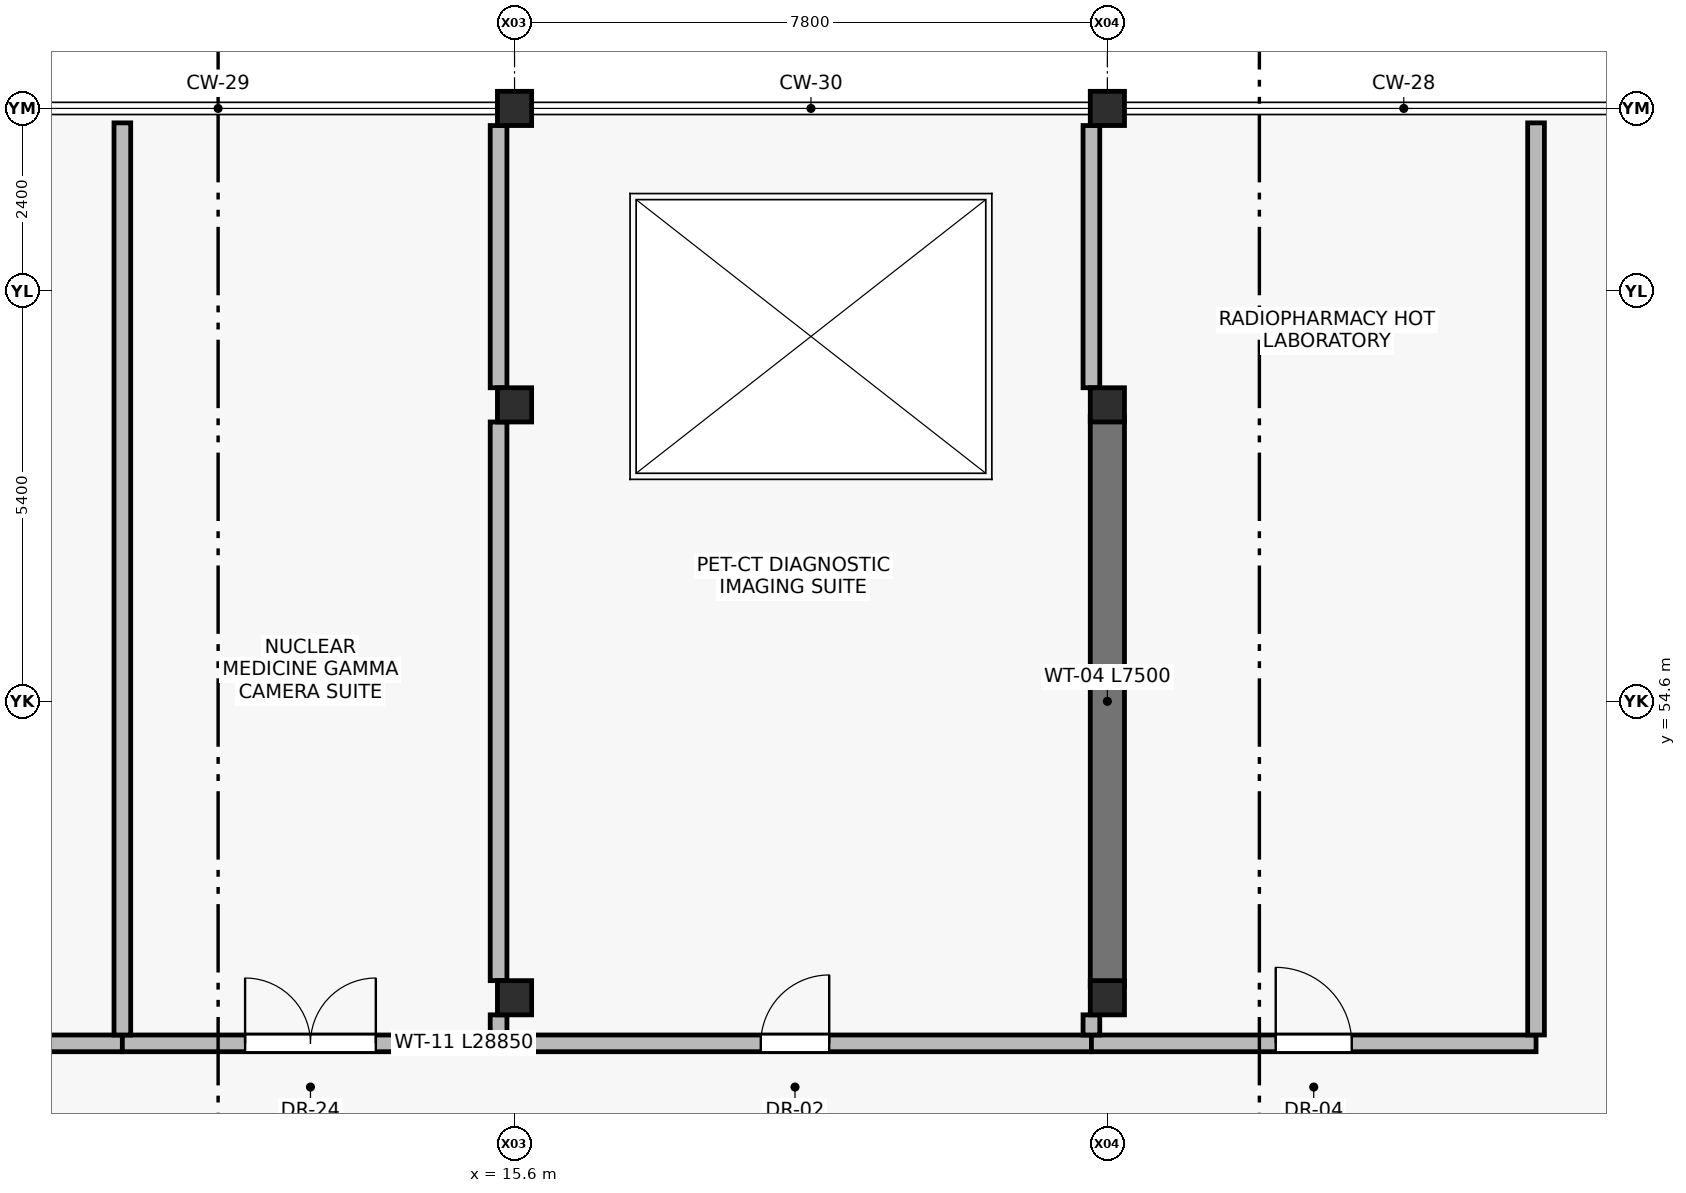
"""IFC4 building model, lengths in metres.
Left out: names, types, materials, properties, quantities, classifications, styles, units other than length and angle.
Written with IfcOpenShell. Run it as: python <this file> out.ifc"""

import sys

from ifc_helpers import new_model, si_unit, direction, frame, frame_2d, origin, origin_2d, place, context, subcontext, project, spatial, rectangle, extrude, element, fill, save


model = new_model("IFC4")
c1 = context("Model", 3, precision=1e-05, world=origin(), true_north=direction((0.0, 1.0)))
c2 = subcontext(c1, "Body", "Model", "MODEL_VIEW")
j1 = project(units=[si_unit("LENGTHUNIT", "METRE"), si_unit("PLANEANGLEUNIT", "RADIAN")], contexts=[c1])
p1 = place(None, origin())
s1 = spatial("IfcSite", under=j1, at=p1, CompositionType="ELEMENT")
p2 = place(p1, origin())
s2 = spatial("IfcBuilding", under=s1, at=p2, CompositionType="ELEMENT")
p3 = place(p2, frame((0.0, 0.0, 9.6)))
s3 = spatial("IfcBuildingStorey", under=s2, at=p3, CompositionType="ELEMENT", Elevation=9.6)
for number, where, z_axis, x_axis in (
    (1, (15.6, 50.7, 0.0), (0.0, 0.0, 1.0), (1.0, 0.0, 0.0)),
    (2, (15.6, 58.5, 0.0), (0.0, 0.0, 1.0), (1.0, 0.0, 0.0)),
    (3, (15.6, 62.4, 0.0), (0.0, 0.0, 1.0), (1.0, 0.0, 0.0)),
    (4, (23.4, 50.7, 0.0), (0.0, 0.0, 1.0), (1.0, 0.0, 0.0)),
    (5, (23.4, 58.5, 0.0), (0.0, 0.0, 1.0), (1.0, 0.0, 0.0)),
    (6, (23.4, 62.4, 0.0), (0.0, 0.0, 1.0), (1.0, 0.0, 0.0)),
):
    element("IfcColumn", number, at=place(p3, frame(where, z_axis=z_axis, x_axis=x_axis)), inside=s3, PredefinedType="COLUMN", context=c2, shape_type="SweptSolid", body=[
        extrude(rectangle(XDim=0.45, YDim=0.45, at=origin_2d()), origin(), (0.0, 0.0, 1.0), 4.5),
    ])
p4 = place(p3, frame((23.4, 50.85, 0.0), z_axis=(0.0, 0.0, 1.0), x_axis=(0.0, 1.0, 0.0)))
e7 = element("IfcWall", 7, at=p4, inside=s3, PredefinedType="SHEAR", context=c2, shape_type="SweptSolid", body=[
    extrude(rectangle(XDim=7.5, YDim=0.45, at=frame_2d((3.75, 0.0))), origin(), (0.0, 0.0, 1.0), 4.24),
])
p5 = place(p3, frame((4.04, 50.1, 0.0), z_axis=(0.0, 0.0, 1.0), x_axis=(1.0, 0.0, 0.0)))
e8 = element("IfcWall", 8, at=p5, inside=s3, PredefinedType="PARTITIONING", context=c2, shape_type="SweptSolid", body=[
    extrude(rectangle(XDim=6.4, YDim=0.22, at=frame_2d((3.2, 0.0))), origin(), (0.0, 0.0, 1.0), 4.24),
])
p6 = place(p5, frame((1.5, 0.0, 0.0)))
e9 = element("IfcOpeningElement", 9, at=p6, cuts=e8, PredefinedType="OPENING", context=c2, shape_type="SweptSolid", body=[
    extrude(rectangle(XDim=1.48, YDim=2.25, at=frame_2d((0.74, 1.125))), frame((0.0, 0.12, 0.0), z_axis=(0.0, -1.0, 0.0), x_axis=(1.0, 0.0, 0.0)), (0.0, 0.0, 1.0), 0.24),
])
p7 = place(p3, frame((10.44, 50.1, 0.0), z_axis=(0.0, 0.0, 1.0), x_axis=(1.0, 0.0, 0.0)))
e10 = element("IfcWall", 10, at=p7, inside=s3, PredefinedType="PARTITIONING", context=c2, shape_type="SweptSolid", body=[
    extrude(rectangle(XDim=4.95, YDim=0.22, at=frame_2d((2.475, 0.0))), origin(), (0.0, 0.0, 1.0), 4.24),
])
p8 = place(p7, frame((1.615, 0.0, 0.0)))
e11 = element("IfcOpeningElement", 11, at=p8, cuts=e10, PredefinedType="OPENING", context=c2, shape_type="SweptSolid", body=[
    extrude(rectangle(XDim=1.72, YDim=2.3, at=frame_2d((0.86, 1.15))), frame((0.0, 0.12, 0.0), z_axis=(0.0, -1.0, 0.0), x_axis=(1.0, 0.0, 0.0)), (0.0, 0.0, 1.0), 0.24),
])
p9 = place(p3, frame((15.39, 50.1, 0.0), z_axis=(0.0, 0.0, 1.0), x_axis=(1.0, 0.0, 0.0)))
e12 = element("IfcWall", 12, at=p9, inside=s3, PredefinedType="PARTITIONING", context=c2, shape_type="SweptSolid", body=[
    extrude(rectangle(XDim=7.8, YDim=0.22, at=frame_2d((3.9, 0.0))), origin(), (0.0, 0.0, 1.0), 4.24),
])
p10 = place(p9, frame((3.45, 0.0, 0.0)))
e13 = element("IfcOpeningElement", 13, at=p10, cuts=e12, PredefinedType="OPENING", context=c2, shape_type="SweptSolid", body=[
    extrude(rectangle(XDim=0.9, YDim=2.1, at=frame_2d((0.45, 1.05))), frame((0.0, 0.12, 0.0), z_axis=(0.0, -1.0, 0.0), x_axis=(1.0, 0.0, 0.0)), (0.0, 0.0, 1.0), 0.24),
])
p11 = place(p3, frame((23.19, 50.1, 0.0), z_axis=(0.0, 0.0, 1.0), x_axis=(1.0, 0.0, 0.0)))
e14 = element("IfcWall", 14, at=p11, inside=s3, PredefinedType="PARTITIONING", context=c2, shape_type="SweptSolid", body=[
    extrude(rectangle(XDim=5.85, YDim=0.22, at=frame_2d((2.925, 0.0))), origin(), (0.0, 0.0, 1.0), 4.24),
])
p12 = place(p11, frame((2.425, 0.0, 0.0)))
e15 = element("IfcOpeningElement", 15, at=p12, cuts=e14, PredefinedType="OPENING", context=c2, shape_type="SweptSolid", body=[
    extrude(rectangle(XDim=1.0, YDim=2.1, at=frame_2d((0.5, 1.05))), frame((0.0, 0.12, 0.0), z_axis=(0.0, -1.0, 0.0), x_axis=(1.0, 0.0, 0.0)), (0.0, 0.0, 1.0), 0.24),
])
p13 = place(p3, frame((10.44, 50.21, 0.0), z_axis=(0.0, 0.0, 1.0), x_axis=(0.0, 1.0, 0.0)))
e16 = element("IfcWall", 16, at=p13, inside=s3, PredefinedType="PARTITIONING", context=c2, shape_type="SweptSolid", body=[
    extrude(rectangle(XDim=12.0, YDim=0.22, at=frame_2d((6.0, 0.0))), origin(), (0.0, 0.0, 1.0), 4.24),
])
p14 = place(p3, frame((15.39, 50.21, 0.0), z_axis=(0.0, 0.0, 1.0), x_axis=(0.0, 1.0, 0.0)))
e17 = element("IfcWall", 17, at=p14, inside=s3, PredefinedType="PARTITIONING", context=c2, shape_type="SweptSolid", body=[
    extrude(rectangle(XDim=0.265, YDim=0.22, at=frame_2d((0.133, 0.0))), origin(), (0.0, 0.0, 1.0), 4.24),
])
p15 = place(p3, frame((15.39, 50.925, 0.0), z_axis=(0.0, 0.0, 1.0), x_axis=(0.0, 1.0, 0.0)))
e18 = element("IfcWall", 18, at=p15, inside=s3, PredefinedType="PARTITIONING", context=c2, shape_type="SweptSolid", body=[
    extrude(rectangle(XDim=7.35, YDim=0.22, at=frame_2d((3.675, 0.0))), origin(), (0.0, 0.0, 1.0), 4.24),
])
p16 = place(p3, frame((15.39, 58.725, 0.0), z_axis=(0.0, 0.0, 1.0), x_axis=(0.0, 1.0, 0.0)))
e19 = element("IfcWall", 19, at=p16, inside=s3, PredefinedType="PARTITIONING", context=c2, shape_type="SweptSolid", body=[
    extrude(rectangle(XDim=3.45, YDim=0.22, at=frame_2d((1.725, 0.0))), origin(), (0.0, 0.0, 1.0), 4.24),
])
p17 = place(p3, frame((23.19, 50.21, 0.0), z_axis=(0.0, 0.0, 1.0), x_axis=(0.0, 1.0, 0.0)))
e20 = element("IfcWall", 20, at=p17, inside=s3, PredefinedType="PARTITIONING", context=c2, shape_type="SweptSolid", body=[
    extrude(rectangle(XDim=0.265, YDim=0.22, at=frame_2d((0.133, 0.0))), origin(), (0.0, 0.0, 1.0), 4.24),
])
p18 = place(p3, frame((23.19, 58.725, 0.0), z_axis=(0.0, 0.0, 1.0), x_axis=(0.0, 1.0, 0.0)))
e21 = element("IfcWall", 21, at=p18, inside=s3, PredefinedType="PARTITIONING", context=c2, shape_type="SweptSolid", body=[
    extrude(rectangle(XDim=3.45, YDim=0.22, at=frame_2d((1.725, 0.0))), origin(), (0.0, 0.0, 1.0), 4.24),
])
p19 = place(p3, frame((29.04, 50.21, 0.0), z_axis=(0.0, 0.0, 1.0), x_axis=(0.0, 1.0, 0.0)))
e22 = element("IfcWall", 22, at=p19, inside=s3, PredefinedType="PARTITIONING", context=c2, shape_type="SweptSolid", body=[
    extrude(rectangle(XDim=12.0, YDim=0.22, at=frame_2d((6.0, 0.0))), origin(), (0.0, 0.0, 1.0), 4.24),
])
p20 = place(p8, origin())
e23 = element("IfcDoor", 23, at=p20, inside=s3, OperationType="DOUBLE_DOOR_SINGLE_SWING", PredefinedType="DOOR", context=c2, shape_type="SweptSolid", body=[
    extrude(rectangle(XDim=1.72, YDim=2.3, at=frame_2d((0.86, 1.15))), frame((0.0, 0.025, 0.0), z_axis=(0.0, -1.0, 0.0), x_axis=(1.0, 0.0, 0.0)), (0.0, 0.0, 1.0), 0.05),
])
fill(e11, e23)
p21 = place(p10, origin())
e24 = element("IfcDoor", 24, at=p21, inside=s3, OperationType="SINGLE_SWING_RIGHT", PredefinedType="DOOR", context=c2, shape_type="SweptSolid", body=[
    extrude(rectangle(XDim=0.9, YDim=2.1, at=frame_2d((0.45, 1.05))), frame((0.0, 0.025, 0.0), z_axis=(0.0, -1.0, 0.0), x_axis=(1.0, 0.0, 0.0)), (0.0, 0.0, 1.0), 0.05),
])
fill(e13, e24)
p22 = place(p12, origin())
e25 = element("IfcDoor", 25, at=p22, inside=s3, OperationType="SINGLE_SWING_LEFT", PredefinedType="DOOR", context=c2, shape_type="SweptSolid", body=[
    extrude(rectangle(XDim=1.0, YDim=2.1, at=frame_2d((0.5, 1.05))), frame((0.0, 0.025, 0.0), z_axis=(0.0, -1.0, 0.0), x_axis=(1.0, 0.0, 0.0)), (0.0, 0.0, 1.0), 0.05),
])
fill(e15, e25)
save(model, sys.argv[1])
